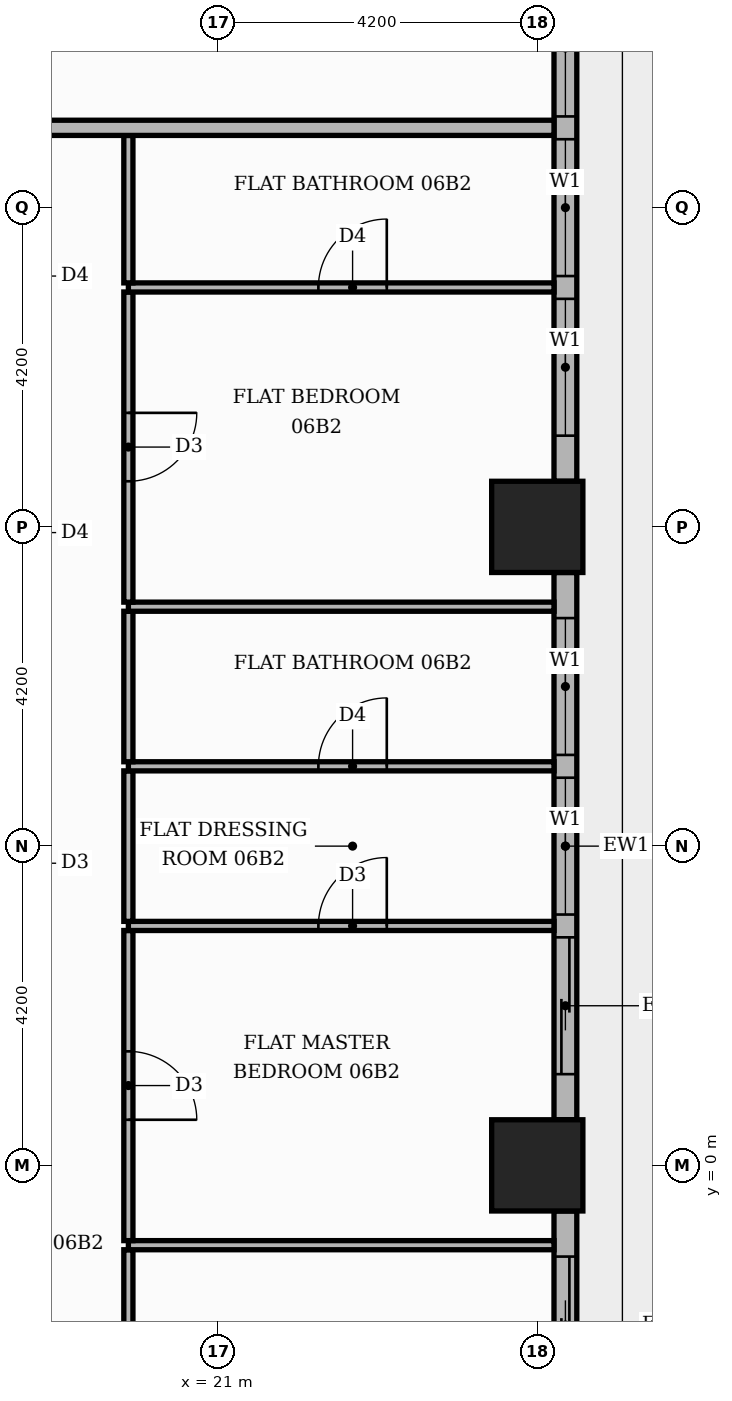
"""IFC4 building model, lengths in metres.
Left out: names, types, materials, properties, quantities, classifications, styles, units other than length and angle.
Written with IfcOpenShell. Run it as: python <this file> out.ifc"""

import sys

from ifc_helpers import new_model, si_unit, direction, frame, frame_2d, origin, origin_2d, place, context, subcontext, project, spatial, rectangle, extrude, element, fill, save


model = new_model("IFC4")
c1 = context("Model", 3, precision=1e-05, world=origin(), true_north=direction((0.0, 1.0)))
c2 = subcontext(c1, "Body", "Model", "MODEL_VIEW")
j1 = project(units=[si_unit("LENGTHUNIT", "METRE"), si_unit("PLANEANGLEUNIT", "RADIAN")], contexts=[c1])
p1 = place(None, origin())
s1 = spatial("IfcSite", under=j1, at=p1, CompositionType="ELEMENT")
p2 = place(p1, origin())
s2 = spatial("IfcBuilding", under=s1, at=p2, CompositionType="ELEMENT")
p3 = place(p2, frame((0.0, 0.0, 30.9)))
s3 = spatial("IfcBuildingStorey", under=s2, at=p3, CompositionType="ELEMENT", Elevation=30.9)
for number, where, z_axis, x_axis in (
    (1, (25.2, 0.0, 0.0), (0.0, 0.0, 1.0), (1.0, 0.0, 0.0)),
    (2, (25.2, 8.4, 0.0), (0.0, 0.0, 1.0), (1.0, 0.0, 0.0)),
):
    element("IfcColumn", number, at=place(p3, frame(where, z_axis=z_axis, x_axis=x_axis)), inside=s3, PredefinedType="COLUMN", context=c2, shape_type="SweptSolid", body=[
        extrude(rectangle(XDim=1.2, YDim=1.2, at=origin_2d()), origin(), (0.0, 0.0, 1.0), 3.9),
    ])
p4 = place(p3, frame((25.57, -7.8, 0.0), z_axis=(0.0, 0.0, 1.0), x_axis=(0.0, 1.0, 0.0)))
e3 = element("IfcWall", 3, at=p4, inside=s3, PredefinedType="STANDARD", context=c2, shape_type="SweptSolid", body=[
    extrude(rectangle(XDim=7.2, YDim=0.3, at=frame_2d((3.6, 0.0))), origin(), (0.0, 0.0, 1.0), 3.48),
])
p5 = place(p4, frame((0.6, 0.0, 0.9)))
e4 = element("IfcOpeningElement", 4, at=p5, cuts=e3, PredefinedType="OPENING", context=c2, shape_type="SweptSolid", body=[
    extrude(rectangle(XDim=1.8, YDim=2.1, at=frame_2d((0.9, 1.05))), frame((0.0, 0.16, 0.0), z_axis=(0.0, -1.0, 0.0), x_axis=(1.0, 0.0, 0.0)), (0.0, 0.0, 1.0), 0.32),
])
p6 = place(p4, frame((2.7, 0.0, 0.9)))
e5 = element("IfcOpeningElement", 5, at=p6, cuts=e3, PredefinedType="OPENING", context=c2, shape_type="SweptSolid", body=[
    extrude(rectangle(XDim=1.8, YDim=2.1, at=frame_2d((0.9, 1.05))), frame((0.0, 0.16, 0.0), z_axis=(0.0, -1.0, 0.0), x_axis=(1.0, 0.0, 0.0)), (0.0, 0.0, 1.0), 0.32),
])
p7 = place(p4, frame((4.8, 0.0, 0.0)))
e6 = element("IfcOpeningElement", 6, at=p7, cuts=e3, PredefinedType="OPENING", context=c2, shape_type="SweptSolid", body=[
    extrude(rectangle(XDim=1.8, YDim=2.4, at=frame_2d((0.9, 1.2))), frame((0.0, 0.16, 0.0), z_axis=(0.0, -1.0, 0.0), x_axis=(1.0, 0.0, 0.0)), (0.0, 0.0, 1.0), 0.32),
])
p8 = place(p3, frame((25.57, 0.6, 0.0), z_axis=(0.0, 0.0, 1.0), x_axis=(0.0, 1.0, 0.0)))
e7 = element("IfcWall", 7, at=p8, inside=s3, PredefinedType="STANDARD", context=c2, shape_type="SweptSolid", body=[
    extrude(rectangle(XDim=7.2, YDim=0.3, at=frame_2d((3.6, 0.0))), origin(), (0.0, 0.0, 1.0), 3.48),
])
p9 = place(p8, frame((0.6, 0.0, 0.0)))
e8 = element("IfcOpeningElement", 8, at=p9, cuts=e7, PredefinedType="OPENING", context=c2, shape_type="SweptSolid", body=[
    extrude(rectangle(XDim=1.8, YDim=2.4, at=frame_2d((0.9, 1.2))), frame((0.0, 0.16, 0.0), z_axis=(0.0, -1.0, 0.0), x_axis=(1.0, 0.0, 0.0)), (0.0, 0.0, 1.0), 0.32),
])
p10 = place(p8, frame((2.7, 0.0, 0.9)))
e9 = element("IfcOpeningElement", 9, at=p10, cuts=e7, PredefinedType="OPENING", context=c2, shape_type="SweptSolid", body=[
    extrude(rectangle(XDim=1.8, YDim=2.1, at=frame_2d((0.9, 1.05))), frame((0.0, 0.16, 0.0), z_axis=(0.0, -1.0, 0.0), x_axis=(1.0, 0.0, 0.0)), (0.0, 0.0, 1.0), 0.32),
])
p11 = place(p8, frame((4.8, 0.0, 0.9)))
e10 = element("IfcOpeningElement", 10, at=p11, cuts=e7, PredefinedType="OPENING", context=c2, shape_type="SweptSolid", body=[
    extrude(rectangle(XDim=1.8, YDim=2.1, at=frame_2d((0.9, 1.05))), frame((0.0, 0.16, 0.0), z_axis=(0.0, -1.0, 0.0), x_axis=(1.0, 0.0, 0.0)), (0.0, 0.0, 1.0), 0.32),
])
p12 = place(p3, frame((25.57, 9.0, 0.0), z_axis=(0.0, 0.0, 1.0), x_axis=(0.0, 1.0, 0.0)))
e11 = element("IfcWall", 11, at=p12, inside=s3, PredefinedType="STANDARD", context=c2, shape_type="SweptSolid", body=[
    extrude(rectangle(XDim=7.2, YDim=0.3, at=frame_2d((3.6, 0.0))), origin(), (0.0, 0.0, 1.0), 3.48),
])
p13 = place(p12, frame((0.6, 0.0, 0.9)))
e12 = element("IfcOpeningElement", 12, at=p13, cuts=e11, PredefinedType="OPENING", context=c2, shape_type="SweptSolid", body=[
    extrude(rectangle(XDim=1.8, YDim=2.1, at=frame_2d((0.9, 1.05))), frame((0.0, 0.16, 0.0), z_axis=(0.0, -1.0, 0.0), x_axis=(1.0, 0.0, 0.0)), (0.0, 0.0, 1.0), 0.32),
])
p14 = place(p12, frame((2.7, 0.0, 0.9)))
e13 = element("IfcOpeningElement", 13, at=p14, cuts=e11, PredefinedType="OPENING", context=c2, shape_type="SweptSolid", body=[
    extrude(rectangle(XDim=1.8, YDim=2.1, at=frame_2d((0.9, 1.05))), frame((0.0, 0.16, 0.0), z_axis=(0.0, -1.0, 0.0), x_axis=(1.0, 0.0, 0.0)), (0.0, 0.0, 1.0), 0.32),
])
p15 = place(p12, frame((4.8, 0.0, 0.9)))
e14 = element("IfcOpeningElement", 14, at=p15, cuts=e11, PredefinedType="OPENING", context=c2, shape_type="SweptSolid", body=[
    extrude(rectangle(XDim=1.8, YDim=2.1, at=frame_2d((0.9, 1.05))), frame((0.0, 0.16, 0.0), z_axis=(0.0, -1.0, 0.0), x_axis=(1.0, 0.0, 0.0)), (0.0, 0.0, 1.0), 0.32),
])
p16 = place(p3, frame((19.82, -5.15, 0.0), z_axis=(0.0, 0.0, 1.0), x_axis=(0.0, 1.0, 0.0)))
e15 = element("IfcWall", 15, at=p16, inside=s3, PredefinedType="PARTITIONING", context=c2, shape_type="SweptSolid", body=[
    extrude(rectangle(XDim=4.04, YDim=0.12, at=frame_2d((2.02, 0.0))), origin(), (0.0, 0.0, 1.0), 3.48),
])
p17 = place(p16, frame((1.5, 0.0, 0.0)))
e16 = element("IfcOpeningElement", 16, at=p17, cuts=e15, PredefinedType="OPENING", context=c2, shape_type="SweptSolid", body=[
    extrude(rectangle(XDim=1.0, YDim=2.1, at=frame_2d((0.5, 1.05))), frame((0.0, 0.07, 0.0), z_axis=(0.0, -1.0, 0.0), x_axis=(1.0, 0.0, 0.0)), (0.0, 0.0, 1.0), 0.14),
])
p18 = place(p3, frame((19.82, -1.05, 0.0), z_axis=(0.0, 0.0, 1.0), x_axis=(1.0, 0.0, 0.0)))
e17 = element("IfcWall", 17, at=p18, inside=s3, PredefinedType="PARTITIONING", context=c2, shape_type="SweptSolid", body=[
    extrude(rectangle(XDim=5.6, YDim=0.12, at=frame_2d((2.8, 0.0))), origin(), (0.0, 0.0, 1.0), 3.48),
])
p19 = place(p3, frame((19.82, -0.99, 0.0), z_axis=(0.0, 0.0, 1.0), x_axis=(0.0, 1.0, 0.0)))
e18 = element("IfcWall", 18, at=p19, inside=s3, PredefinedType="PARTITIONING", context=c2, shape_type="SweptSolid", body=[
    extrude(rectangle(XDim=4.08, YDim=0.12, at=frame_2d((2.04, 0.0))), origin(), (0.0, 0.0, 1.0), 3.48),
])
p20 = place(p19, frame((1.59, 0.0, 0.0)))
e19 = element("IfcOpeningElement", 19, at=p20, cuts=e18, PredefinedType="OPENING", context=c2, shape_type="SweptSolid", body=[
    extrude(rectangle(XDim=0.9, YDim=2.1, at=frame_2d((0.45, 1.05))), frame((0.0, 0.07, 0.0), z_axis=(0.0, -1.0, 0.0), x_axis=(1.0, 0.0, 0.0)), (0.0, 0.0, 1.0), 0.14),
])
p21 = place(p3, frame((19.82, 3.15, 0.0), z_axis=(0.0, 0.0, 1.0), x_axis=(1.0, 0.0, 0.0)))
e20 = element("IfcWall", 20, at=p21, inside=s3, PredefinedType="PARTITIONING", context=c2, shape_type="SweptSolid", body=[
    extrude(rectangle(XDim=5.6, YDim=0.12, at=frame_2d((2.8, 0.0))), origin(), (0.0, 0.0, 1.0), 3.48),
])
p22 = place(p21, frame((2.5, 0.0, 0.0)))
e21 = element("IfcOpeningElement", 21, at=p22, cuts=e20, PredefinedType="OPENING", context=c2, shape_type="SweptSolid", body=[
    extrude(rectangle(XDim=0.9, YDim=2.1, at=frame_2d((0.45, 1.05))), frame((0.0, 0.07, 0.0), z_axis=(0.0, -1.0, 0.0), x_axis=(1.0, 0.0, 0.0)), (0.0, 0.0, 1.0), 0.14),
])
p23 = place(p3, frame((19.82, 3.21, 0.0), z_axis=(0.0, 0.0, 1.0), x_axis=(0.0, 1.0, 0.0)))
e22 = element("IfcWall", 22, at=p23, inside=s3, PredefinedType="PARTITIONING", context=c2, shape_type="SweptSolid", body=[
    extrude(rectangle(XDim=1.98, YDim=0.12, at=frame_2d((0.99, 0.0))), origin(), (0.0, 0.0, 1.0), 3.48),
])
p24 = place(p3, frame((19.82, 5.25, 0.0), z_axis=(0.0, 0.0, 1.0), x_axis=(1.0, 0.0, 0.0)))
e23 = element("IfcWall", 23, at=p24, inside=s3, PredefinedType="PARTITIONING", context=c2, shape_type="SweptSolid", body=[
    extrude(rectangle(XDim=5.6, YDim=0.12, at=frame_2d((2.8, 0.0))), origin(), (0.0, 0.0, 1.0), 3.48),
])
p25 = place(p24, frame((2.5, 0.0, 0.0)))
e24 = element("IfcOpeningElement", 24, at=p25, cuts=e23, PredefinedType="OPENING", context=c2, shape_type="SweptSolid", body=[
    extrude(rectangle(XDim=0.9, YDim=2.1, at=frame_2d((0.45, 1.05))), frame((0.0, 0.07, 0.0), z_axis=(0.0, -1.0, 0.0), x_axis=(1.0, 0.0, 0.0)), (0.0, 0.0, 1.0), 0.14),
])
p26 = place(p3, frame((19.82, 5.31, 0.0), z_axis=(0.0, 0.0, 1.0), x_axis=(0.0, 1.0, 0.0)))
e25 = element("IfcWall", 25, at=p26, inside=s3, PredefinedType="PARTITIONING", context=c2, shape_type="SweptSolid", body=[
    extrude(rectangle(XDim=1.98, YDim=0.12, at=frame_2d((0.99, 0.0))), origin(), (0.0, 0.0, 1.0), 3.48),
])
p27 = place(p3, frame((19.82, 7.35, 0.0), z_axis=(0.0, 0.0, 1.0), x_axis=(1.0, 0.0, 0.0)))
e26 = element("IfcWall", 26, at=p27, inside=s3, PredefinedType="PARTITIONING", context=c2, shape_type="SweptSolid", body=[
    extrude(rectangle(XDim=5.6, YDim=0.12, at=frame_2d((2.8, 0.0))), origin(), (0.0, 0.0, 1.0), 3.48),
])
p28 = place(p3, frame((19.82, 7.41, 0.0), z_axis=(0.0, 0.0, 1.0), x_axis=(0.0, 1.0, 0.0)))
e27 = element("IfcWall", 27, at=p28, inside=s3, PredefinedType="PARTITIONING", context=c2, shape_type="SweptSolid", body=[
    extrude(rectangle(XDim=4.08, YDim=0.12, at=frame_2d((2.04, 0.0))), origin(), (0.0, 0.0, 1.0), 3.48),
])
p29 = place(p28, frame((1.59, 0.0, 0.0)))
e28 = element("IfcOpeningElement", 28, at=p29, cuts=e27, PredefinedType="OPENING", context=c2, shape_type="SweptSolid", body=[
    extrude(rectangle(XDim=0.9, YDim=2.1, at=frame_2d((0.45, 1.05))), frame((0.0, 0.07, 0.0), z_axis=(0.0, -1.0, 0.0), x_axis=(1.0, 0.0, 0.0)), (0.0, 0.0, 1.0), 0.14),
])
p30 = place(p3, frame((19.82, 11.55, 0.0), z_axis=(0.0, 0.0, 1.0), x_axis=(1.0, 0.0, 0.0)))
e29 = element("IfcWall", 29, at=p30, inside=s3, PredefinedType="PARTITIONING", context=c2, shape_type="SweptSolid", body=[
    extrude(rectangle(XDim=5.6, YDim=0.12, at=frame_2d((2.8, 0.0))), origin(), (0.0, 0.0, 1.0), 3.48),
])
p31 = place(p30, frame((2.5, 0.0, 0.0)))
e30 = element("IfcOpeningElement", 30, at=p31, cuts=e29, PredefinedType="OPENING", context=c2, shape_type="SweptSolid", body=[
    extrude(rectangle(XDim=0.9, YDim=2.1, at=frame_2d((0.45, 1.05))), frame((0.0, 0.07, 0.0), z_axis=(0.0, -1.0, 0.0), x_axis=(1.0, 0.0, 0.0)), (0.0, 0.0, 1.0), 0.14),
])
p32 = place(p3, frame((19.82, 11.61, 0.0), z_axis=(0.0, 0.0, 1.0), x_axis=(0.0, 1.0, 0.0)))
e31 = element("IfcWall", 31, at=p32, inside=s3, PredefinedType="PARTITIONING", context=c2, shape_type="SweptSolid", body=[
    extrude(rectangle(XDim=1.94, YDim=0.12, at=frame_2d((0.97, 0.0))), origin(), (0.0, 0.0, 1.0), 3.48),
])
p33 = place(p3, frame((-13.65, 13.65, 0.0), z_axis=(0.0, 0.0, 1.0), x_axis=(1.0, 0.0, 0.0)))
e32 = element("IfcWall", 32, at=p33, inside=s3, PredefinedType="PARTITIONING", context=c2, shape_type="SweptSolid", body=[
    extrude(rectangle(XDim=39.07, YDim=0.2, at=frame_2d((19.535, 0.0))), origin(), (0.0, 0.0, 1.0), 3.48),
])
p34 = place(p33, frame((24.65, 0.0, 0.0)))
e33 = element("IfcOpeningElement", 33, at=p34, cuts=e32, PredefinedType="OPENING", context=c2, shape_type="SweptSolid", body=[
    extrude(rectangle(XDim=1.1, YDim=2.4, at=frame_2d((0.55, 1.2))), frame((0.0, 0.11, 0.0), z_axis=(0.0, -1.0, 0.0), x_axis=(1.0, 0.0, 0.0)), (0.0, 0.0, 1.0), 0.22),
])
p35 = place(p33, frame((14.15, 0.0, 0.0)))
e34 = element("IfcOpeningElement", 34, at=p35, cuts=e32, PredefinedType="OPENING", context=c2, shape_type="SweptSolid", body=[
    extrude(rectangle(XDim=1.1, YDim=2.4, at=frame_2d((0.55, 1.2))), frame((0.0, 0.11, 0.0), z_axis=(0.0, -1.0, 0.0), x_axis=(1.0, 0.0, 0.0)), (0.0, 0.0, 1.0), 0.22),
])
p36 = place(p7, origin())
e35 = element("IfcDoor", 35, at=p36, inside=s3, OperationType="SLIDING_TO_RIGHT", PredefinedType="DOOR", context=c2, shape_type="SweptSolid", body=[
    extrude(rectangle(XDim=1.8, YDim=2.4, at=frame_2d((0.9, 1.2))), frame((0.0, 0.025, 0.0), z_axis=(0.0, -1.0, 0.0), x_axis=(1.0, 0.0, 0.0)), (0.0, 0.0, 1.0), 0.05),
])
fill(e6, e35)
p37 = place(p9, origin())
e36 = element("IfcDoor", 36, at=p37, inside=s3, OperationType="SLIDING_TO_LEFT", PredefinedType="DOOR", context=c2, shape_type="SweptSolid", body=[
    extrude(rectangle(XDim=1.8, YDim=2.4, at=frame_2d((0.9, 1.2))), frame((0.0, 0.025, 0.0), z_axis=(0.0, -1.0, 0.0), x_axis=(1.0, 0.0, 0.0)), (0.0, 0.0, 1.0), 0.05),
])
fill(e8, e36)
p38 = place(p10, origin())
e37 = element("IfcWindow", 37, at=p38, inside=s3, PartitioningType="SINGLE_PANEL", PredefinedType="WINDOW", context=c2, shape_type="SweptSolid", body=[
    extrude(rectangle(XDim=1.8, YDim=2.1, at=frame_2d((0.9, 1.05))), frame((0.0, 0.03, 0.0), z_axis=(0.0, -1.0, 0.0), x_axis=(1.0, 0.0, 0.0)), (0.0, 0.0, 1.0), 0.06),
])
fill(e9, e37)
p39 = place(p11, origin())
e38 = element("IfcWindow", 38, at=p39, inside=s3, PartitioningType="SINGLE_PANEL", PredefinedType="WINDOW", context=c2, shape_type="SweptSolid", body=[
    extrude(rectangle(XDim=1.8, YDim=2.1, at=frame_2d((0.9, 1.05))), frame((0.0, 0.03, 0.0), z_axis=(0.0, -1.0, 0.0), x_axis=(1.0, 0.0, 0.0)), (0.0, 0.0, 1.0), 0.06),
])
fill(e10, e38)
p40 = place(p13, origin())
e39 = element("IfcWindow", 39, at=p40, inside=s3, PartitioningType="SINGLE_PANEL", PredefinedType="WINDOW", context=c2, shape_type="SweptSolid", body=[
    extrude(rectangle(XDim=1.8, YDim=2.1, at=frame_2d((0.9, 1.05))), frame((0.0, 0.03, 0.0), z_axis=(0.0, -1.0, 0.0), x_axis=(1.0, 0.0, 0.0)), (0.0, 0.0, 1.0), 0.06),
])
fill(e12, e39)
p41 = place(p14, origin())
e40 = element("IfcWindow", 40, at=p41, inside=s3, PartitioningType="SINGLE_PANEL", PredefinedType="WINDOW", context=c2, shape_type="SweptSolid", body=[
    extrude(rectangle(XDim=1.8, YDim=2.1, at=frame_2d((0.9, 1.05))), frame((0.0, 0.03, 0.0), z_axis=(0.0, -1.0, 0.0), x_axis=(1.0, 0.0, 0.0)), (0.0, 0.0, 1.0), 0.06),
])
fill(e13, e40)
p42 = place(p15, origin())
e41 = element("IfcWindow", 41, at=p42, inside=s3, PartitioningType="SINGLE_PANEL", PredefinedType="WINDOW", context=c2, shape_type="SweptSolid", body=[
    extrude(rectangle(XDim=1.8, YDim=2.1, at=frame_2d((0.9, 1.05))), frame((0.0, 0.03, 0.0), z_axis=(0.0, -1.0, 0.0), x_axis=(1.0, 0.0, 0.0)), (0.0, 0.0, 1.0), 0.06),
])
fill(e14, e41)
p43 = place(p20, frame((0.9, 0.0, 0.0), z_axis=(0.0, 0.0, 1.0), x_axis=(-1.0, 0.0, 0.0)))
e42 = element("IfcDoor", 42, at=p43, inside=s3, OperationType="SINGLE_SWING_LEFT", PredefinedType="DOOR", context=c2, shape_type="SweptSolid", body=[
    extrude(rectangle(XDim=0.9, YDim=2.1, at=frame_2d((0.45, 1.05))), frame((0.0, 0.025, 0.0), z_axis=(0.0, -1.0, 0.0), x_axis=(1.0, 0.0, 0.0)), (0.0, 0.0, 1.0), 0.05),
])
fill(e19, e42)
p44 = place(p22, origin())
e43 = element("IfcDoor", 43, at=p44, inside=s3, OperationType="SINGLE_SWING_RIGHT", PredefinedType="DOOR", context=c2, shape_type="SweptSolid", body=[
    extrude(rectangle(XDim=0.9, YDim=2.1, at=frame_2d((0.45, 1.05))), frame((0.0, 0.025, 0.0), z_axis=(0.0, -1.0, 0.0), x_axis=(1.0, 0.0, 0.0)), (0.0, 0.0, 1.0), 0.05),
])
fill(e21, e43)
p45 = place(p25, origin())
e44 = element("IfcDoor", 44, at=p45, inside=s3, OperationType="SINGLE_SWING_RIGHT", PredefinedType="DOOR", context=c2, shape_type="SweptSolid", body=[
    extrude(rectangle(XDim=0.9, YDim=2.1, at=frame_2d((0.45, 1.05))), frame((0.0, 0.025, 0.0), z_axis=(0.0, -1.0, 0.0), x_axis=(1.0, 0.0, 0.0)), (0.0, 0.0, 1.0), 0.05),
])
fill(e24, e44)
p46 = place(p29, frame((0.9, 0.0, 0.0), z_axis=(0.0, 0.0, 1.0), x_axis=(-1.0, 0.0, 0.0)))
e45 = element("IfcDoor", 45, at=p46, inside=s3, OperationType="SINGLE_SWING_RIGHT", PredefinedType="DOOR", context=c2, shape_type="SweptSolid", body=[
    extrude(rectangle(XDim=0.9, YDim=2.1, at=frame_2d((0.45, 1.05))), frame((0.0, 0.025, 0.0), z_axis=(0.0, -1.0, 0.0), x_axis=(1.0, 0.0, 0.0)), (0.0, 0.0, 1.0), 0.05),
])
fill(e28, e45)
p47 = place(p31, origin())
e46 = element("IfcDoor", 46, at=p47, inside=s3, OperationType="SINGLE_SWING_RIGHT", PredefinedType="DOOR", context=c2, shape_type="SweptSolid", body=[
    extrude(rectangle(XDim=0.9, YDim=2.1, at=frame_2d((0.45, 1.05))), frame((0.0, 0.025, 0.0), z_axis=(0.0, -1.0, 0.0), x_axis=(1.0, 0.0, 0.0)), (0.0, 0.0, 1.0), 0.05),
])
fill(e30, e46)
save(model, sys.argv[1])
